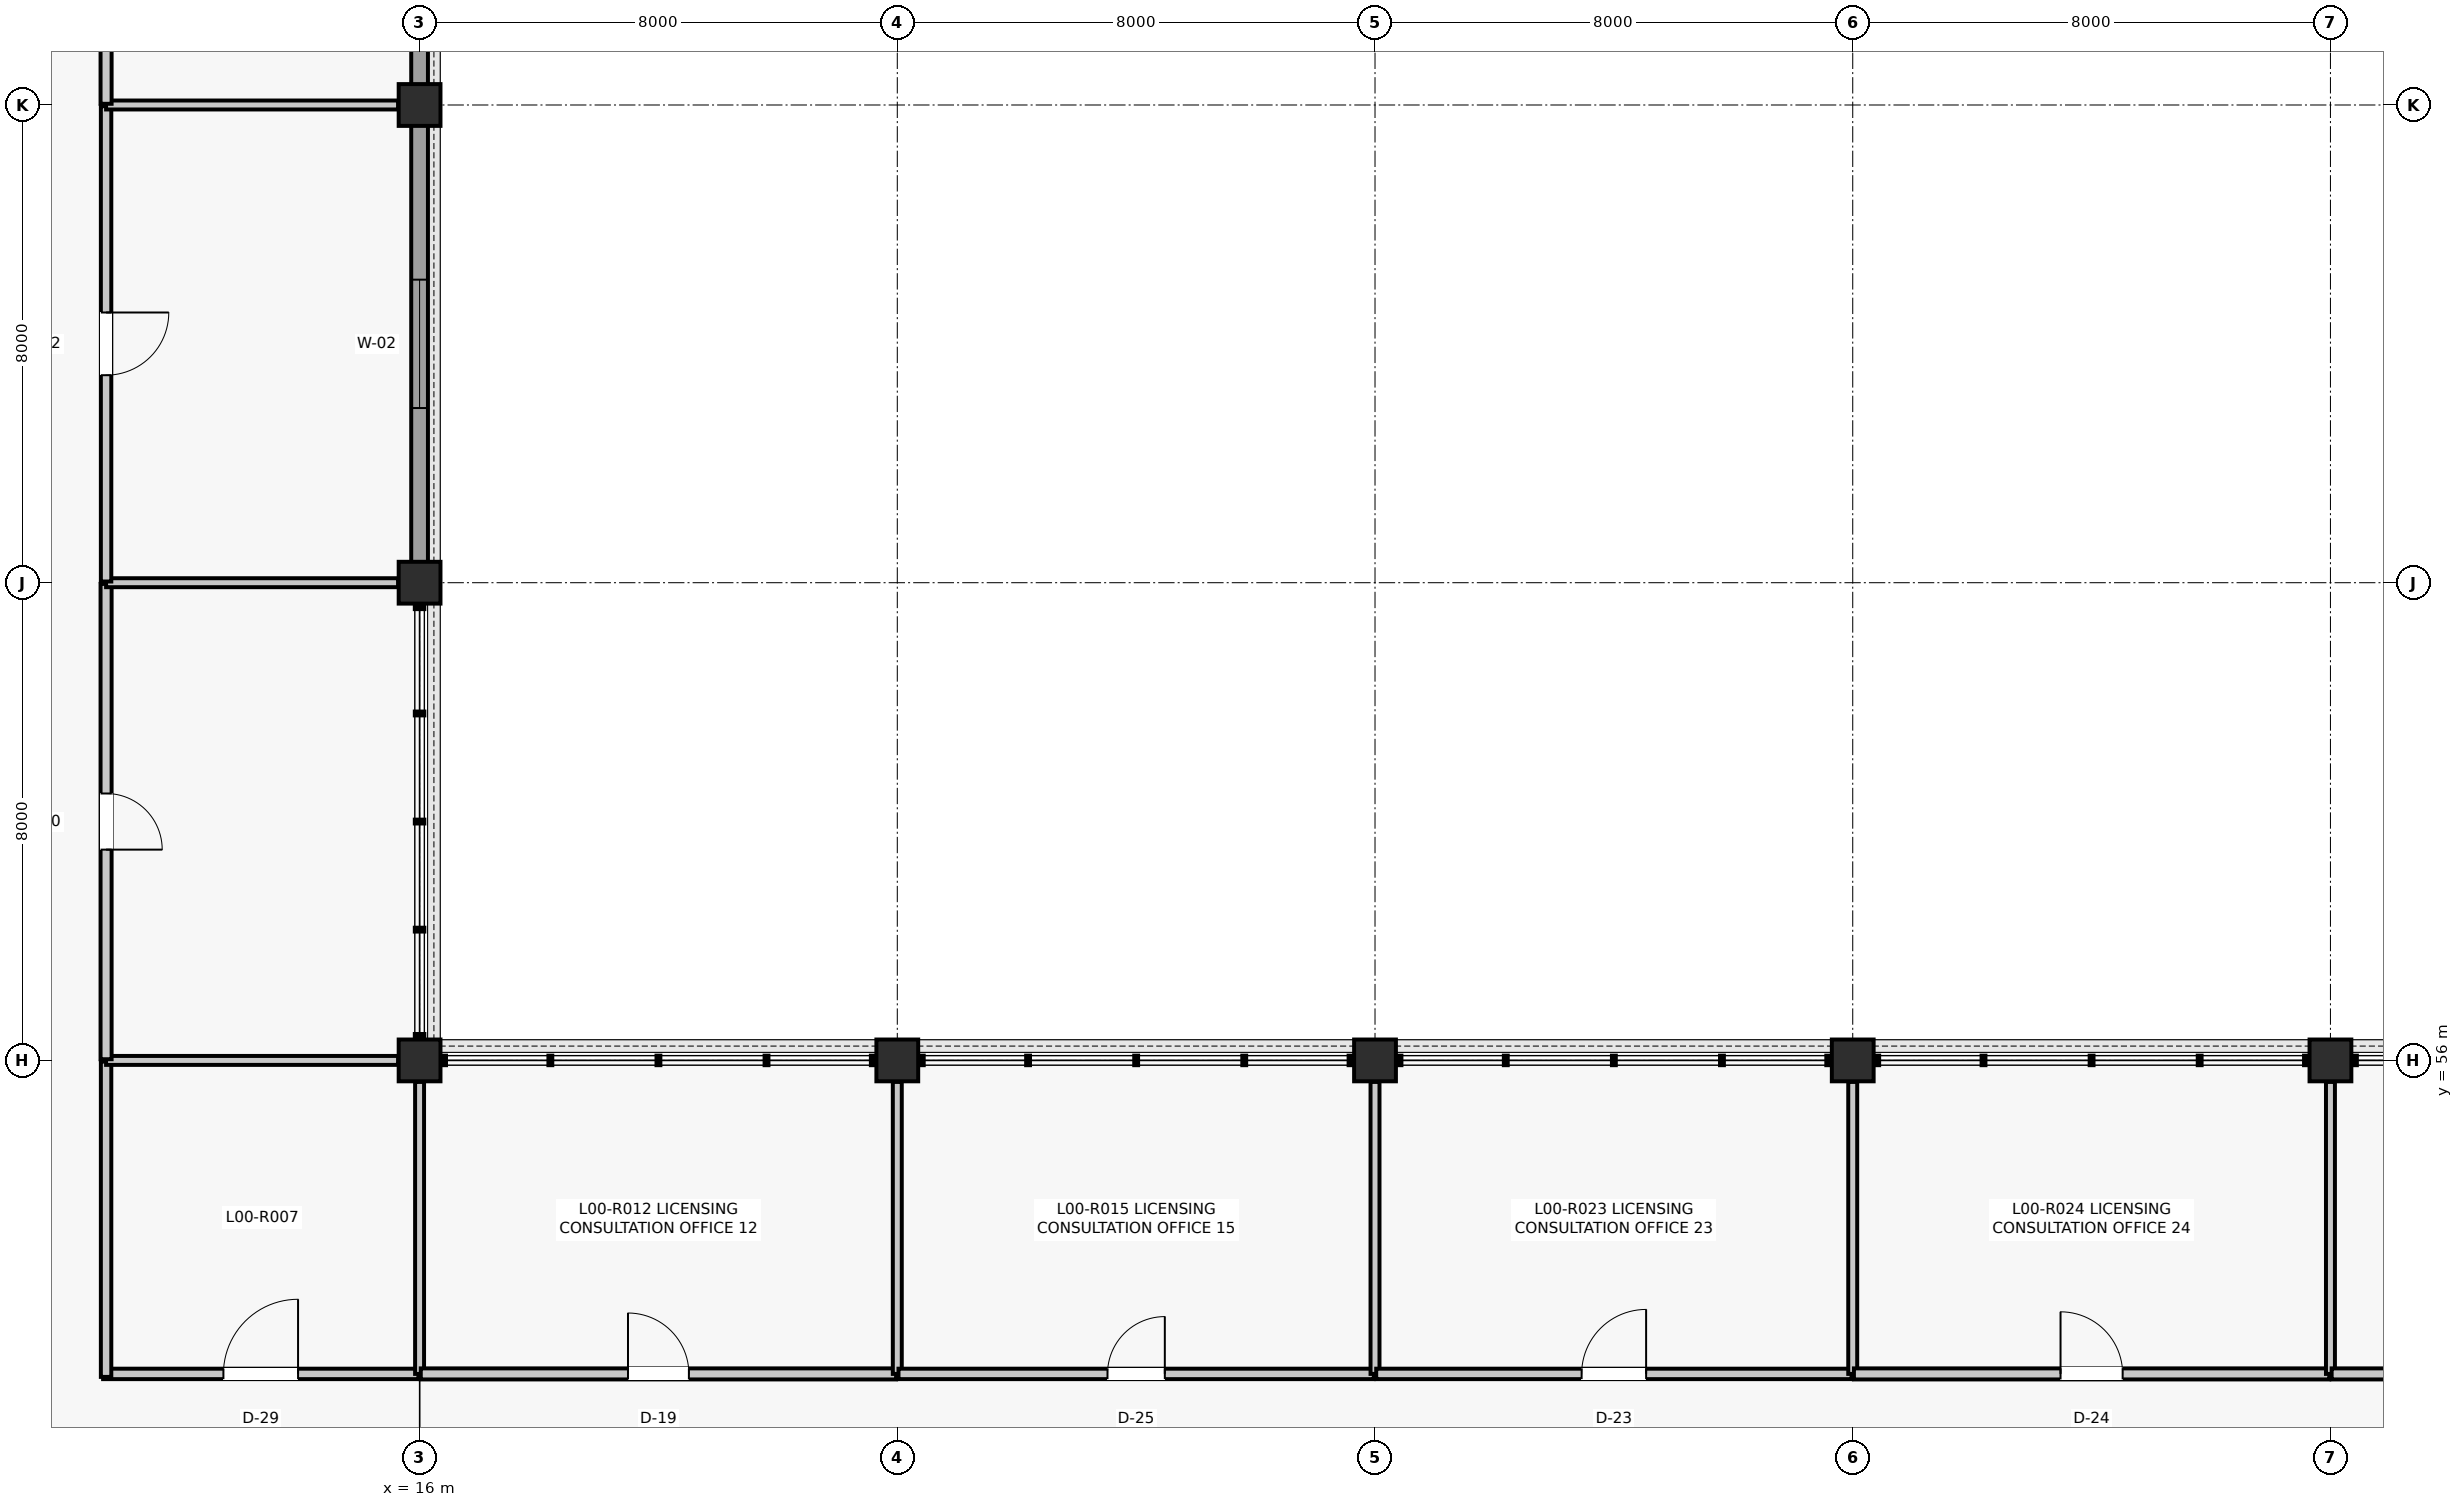
"""IFC4 building model, lengths in metres.
Left out: names, types, materials, properties, quantities, classifications, styles, units other than length and angle.
Written with IfcOpenShell. Run it as: python <this file> out.ifc"""

import sys

from ifc_helpers import new_model, si_unit, direction, frame, frame_2d, origin, origin_2d, place, context, subcontext, project, spatial, rectangle, extrude, element, fill, save


model = new_model("IFC4")
c1 = context("Model", 3, precision=1e-05, world=origin(), true_north=direction((0.0, 1.0)))
c2 = subcontext(c1, "Body", "Model", "MODEL_VIEW")
j1 = project(units=[si_unit("LENGTHUNIT", "METRE"), si_unit("PLANEANGLEUNIT", "RADIAN")], contexts=[c1])
p1 = place(None, origin())
s1 = spatial("IfcSite", under=j1, at=p1, CompositionType="ELEMENT")
p2 = place(p1, origin())
s2 = spatial("IfcBuilding", under=s1, at=p2, CompositionType="ELEMENT")
p3 = place(p2, origin())
s3 = spatial("IfcBuildingStorey", under=s2, at=p3, CompositionType="ELEMENT", Elevation=0.0)
for number, where, z_axis, x_axis in (
    (1, (16.0, 56.0, 0.0), (0.0, 0.0, 1.0), (1.0, 0.0, 0.0)),
    (2, (16.0, 64.0, 0.0), (0.0, 0.0, 1.0), (1.0, 0.0, 0.0)),
    (3, (16.0, 72.0, 0.0), (0.0, 0.0, 1.0), (1.0, 0.0, 0.0)),
    (4, (24.0, 56.0, 0.0), (0.0, 0.0, 1.0), (1.0, 0.0, 0.0)),
    (5, (32.0, 56.0, 0.0), (0.0, 0.0, 1.0), (1.0, 0.0, 0.0)),
    (6, (40.0, 56.0, 0.0), (0.0, 0.0, 1.0), (1.0, 0.0, 0.0)),
    (7, (48.0, 56.0, 0.0), (0.0, 0.0, 1.0), (1.0, 0.0, 0.0)),
):
    element("IfcColumn", number, at=place(p3, frame(where, z_axis=z_axis, x_axis=x_axis)), inside=s3, PredefinedType="COLUMN", context=c2, shape_type="SweptSolid", body=[
        extrude(rectangle(XDim=0.7, YDim=0.7, at=origin_2d()), origin(), (0.0, 0.0, 1.0), 5.28),
    ])
p4 = place(p3, frame((16.0, 64.335, 0.0), z_axis=(0.0, 0.0, 1.0), x_axis=(0.0, 1.0, 0.0)))
e8 = element("IfcWall", 8, at=p4, inside=s3, PredefinedType="SOLIDWALL", context=c2, shape_type="SweptSolid", body=[
    extrude(rectangle(XDim=7.33, YDim=0.28, at=frame_2d((3.665, 0.0))), origin(), (0.0, 0.0, 1.0), 4.619),
])
p5 = place(p4, frame((2.59, 0.0, 0.9)))
e9 = element("IfcOpeningElement", 9, at=p5, cuts=e8, PredefinedType="OPENING", context=c2, shape_type="SweptSolid", body=[
    extrude(rectangle(XDim=2.15, YDim=2.8, at=frame_2d((1.075, 1.4))), frame((0.0, 0.15, 0.0), z_axis=(0.0, -1.0, 0.0), x_axis=(1.0, 0.0, 0.0)), (0.0, 0.0, 1.0), 0.3),
])
p6 = place(p3, frame((16.0, 72.335, 0.0), z_axis=(0.0, 0.0, 1.0), x_axis=(0.0, 1.0, 0.0)))
e10 = element("IfcWall", 10, at=p6, inside=s3, PredefinedType="SOLIDWALL", context=c2, shape_type="SweptSolid", body=[
    extrude(rectangle(XDim=7.33, YDim=0.28, at=frame_2d((3.665, 0.0))), origin(), (0.0, 0.0, 1.0), 4.682),
])
p7 = place(p6, frame((2.74, 0.0, 0.9)))
e11 = element("IfcOpeningElement", 11, at=p7, cuts=e10, PredefinedType="OPENING", context=c2, shape_type="SweptSolid", body=[
    extrude(rectangle(XDim=1.85, YDim=2.65, at=frame_2d((0.925, 1.325))), frame((0.0, 0.15, 0.0), z_axis=(0.0, -1.0, 0.0), x_axis=(1.0, 0.0, 0.0)), (0.0, 0.0, 1.0), 0.3),
])
p8 = place(p3, frame((10.7, 50.75, 0.0), z_axis=(0.0, 0.0, 1.0), x_axis=(1.0, 0.0, 0.0)))
e12 = element("IfcWall", 12, at=p8, inside=s3, PredefinedType="PARTITIONING", context=c2, shape_type="SweptSolid", body=[
    extrude(rectangle(XDim=5.28, YDim=0.175, at=frame_2d((2.64, 0.0))), origin(), (0.0, 0.0, 1.0), 4.403),
])
p9 = place(p8, frame((2.015, 0.0, 0.0)))
e13 = element("IfcOpeningElement", 13, at=p9, cuts=e12, PredefinedType="OPENING", context=c2, shape_type="SweptSolid", body=[
    extrude(rectangle(XDim=1.25, YDim=2.18, at=frame_2d((0.625, 1.09))), frame((0.0, 0.097, 0.0), z_axis=(0.0, -1.0, 0.0), x_axis=(1.0, 0.0, 0.0)), (0.0, 0.0, 1.0), 0.195),
])
p10 = place(p3, frame((10.75, 50.7, 0.0), z_axis=(0.0, 0.0, 1.0), x_axis=(0.0, 1.0, 0.0)))
e14 = element("IfcWall", 14, at=p10, inside=s3, PredefinedType="PARTITIONING", context=c2, shape_type="SweptSolid", body=[
    extrude(rectangle(XDim=5.28, YDim=0.175, at=frame_2d((2.64, 0.0))), origin(), (0.0, 0.0, 1.0), 4.327),
])
p11 = place(p3, frame((10.75, 56.0, 0.0), z_axis=(0.0, 0.0, 1.0), x_axis=(1.0, 0.0, 0.0)))
e15 = element("IfcWall", 15, at=p11, inside=s3, PredefinedType="PARTITIONING", context=c2, shape_type="SweptSolid", body=[
    extrude(rectangle(XDim=4.89, YDim=0.15, at=frame_2d((2.445, 0.0))), origin(), (0.0, 0.0, 1.0), 4.327),
])
p12 = place(p3, frame((16.0, 50.75, 0.0), z_axis=(0.0, 0.0, 1.0), x_axis=(0.0, 1.0, 0.0)))
e16 = element("IfcWall", 16, at=p12, inside=s3, PredefinedType="PARTITIONING", context=c2, shape_type="SweptSolid", body=[
    extrude(rectangle(XDim=4.89, YDim=0.15, at=frame_2d((2.445, 0.0))), origin(), (0.0, 0.0, 1.0), 4.403),
])
p13 = place(p3, frame((10.75, 56.02, 0.0), z_axis=(0.0, 0.0, 1.0), x_axis=(0.0, 1.0, 0.0)))
e17 = element("IfcWall", 17, at=p13, inside=s3, PredefinedType="PARTITIONING", context=c2, shape_type="SweptSolid", body=[
    extrude(rectangle(XDim=7.96, YDim=0.185, at=frame_2d((3.98, 0.0))), origin(), (0.0, 0.0, 1.0), 4.327),
])
p14 = place(p13, frame((3.51, 0.0, 0.0)))
e18 = element("IfcOpeningElement", 18, at=p14, cuts=e17, PredefinedType="OPENING", context=c2, shape_type="SweptSolid", body=[
    extrude(rectangle(XDim=0.94, YDim=2.12, at=frame_2d((0.47, 1.06))), frame((0.0, 0.103, 0.0), z_axis=(0.0, -1.0, 0.0), x_axis=(1.0, 0.0, 0.0)), (0.0, 0.0, 1.0), 0.205),
])
p15 = place(p3, frame((10.75, 64.0, 0.0), z_axis=(0.0, 0.0, 1.0), x_axis=(1.0, 0.0, 0.0)))
e19 = element("IfcWall", 19, at=p15, inside=s3, PredefinedType="PARTITIONING", context=c2, shape_type="SweptSolid", body=[
    extrude(rectangle(XDim=4.89, YDim=0.15, at=frame_2d((2.445, 0.0))), origin(), (0.0, 0.0, 1.0), 4.408),
])
p16 = place(p3, frame((10.75, 64.02, 0.0), z_axis=(0.0, 0.0, 1.0), x_axis=(0.0, 1.0, 0.0)))
e20 = element("IfcWall", 20, at=p16, inside=s3, PredefinedType="PARTITIONING", context=c2, shape_type="SweptSolid", body=[
    extrude(rectangle(XDim=7.96, YDim=0.175, at=frame_2d((3.98, 0.0))), origin(), (0.0, 0.0, 1.0), 4.341),
])
p17 = place(p16, frame((3.455, 0.0, 0.0)))
e21 = element("IfcOpeningElement", 21, at=p17, cuts=e20, PredefinedType="OPENING", context=c2, shape_type="SweptSolid", body=[
    extrude(rectangle(XDim=1.05, YDim=2.15, at=frame_2d((0.525, 1.075))), frame((0.0, 0.097, 0.0), z_axis=(0.0, -1.0, 0.0), x_axis=(1.0, 0.0, 0.0)), (0.0, 0.0, 1.0), 0.195),
])
p18 = place(p3, frame((10.75, 72.0, 0.0), z_axis=(0.0, 0.0, 1.0), x_axis=(1.0, 0.0, 0.0)))
e22 = element("IfcWall", 22, at=p18, inside=s3, PredefinedType="PARTITIONING", context=c2, shape_type="SweptSolid", body=[
    extrude(rectangle(XDim=4.89, YDim=0.15, at=frame_2d((2.445, 0.0))), origin(), (0.0, 0.0, 1.0), 4.341),
])
p19 = place(p3, frame((10.75, 72.02, 0.0), z_axis=(0.0, 0.0, 1.0), x_axis=(0.0, 1.0, 0.0)))
e23 = element("IfcWall", 23, at=p19, inside=s3, PredefinedType="PARTITIONING", context=c2, shape_type="SweptSolid", body=[
    extrude(rectangle(XDim=7.96, YDim=0.185, at=frame_2d((3.98, 0.0))), origin(), (0.0, 0.0, 1.0), 4.341),
])
p20 = place(p19, frame((3.48, 0.0, 0.0)))
e24 = element("IfcOpeningElement", 24, at=p20, cuts=e23, PredefinedType="OPENING", context=c2, shape_type="SweptSolid", body=[
    extrude(rectangle(XDim=1.0, YDim=2.15, at=frame_2d((0.5, 1.075))), frame((0.0, 0.103, 0.0), z_axis=(0.0, -1.0, 0.0), x_axis=(1.0, 0.0, 0.0)), (0.0, 0.0, 1.0), 0.205),
])
p21 = place(p3, frame((16.02, 50.75, 0.0), z_axis=(0.0, 0.0, 1.0), x_axis=(1.0, 0.0, 0.0)))
e25 = element("IfcWall", 25, at=p21, inside=s3, PredefinedType="PARTITIONING", context=c2, shape_type="SweptSolid", body=[
    extrude(rectangle(XDim=7.96, YDim=0.185, at=frame_2d((3.98, 0.0))), origin(), (0.0, 0.0, 1.0), 4.403),
])
p22 = place(p21, frame((3.47, 0.0, 0.0)))
e26 = element("IfcOpeningElement", 26, at=p22, cuts=e25, PredefinedType="OPENING", context=c2, shape_type="SweptSolid", body=[
    extrude(rectangle(XDim=1.02, YDim=2.2, at=frame_2d((0.51, 1.1))), frame((0.0, 0.103, 0.0), z_axis=(0.0, -1.0, 0.0), x_axis=(1.0, 0.0, 0.0)), (0.0, 0.0, 1.0), 0.205),
])
p23 = place(p3, frame((24.0, 50.75, 0.0), z_axis=(0.0, 0.0, 1.0), x_axis=(0.0, 1.0, 0.0)))
e27 = element("IfcWall", 27, at=p23, inside=s3, PredefinedType="PARTITIONING", context=c2, shape_type="SweptSolid", body=[
    extrude(rectangle(XDim=4.89, YDim=0.15, at=frame_2d((2.445, 0.0))), origin(), (0.0, 0.0, 1.0), 4.412),
])
p24 = place(p3, frame((24.02, 50.75, 0.0), z_axis=(0.0, 0.0, 1.0), x_axis=(1.0, 0.0, 0.0)))
e28 = element("IfcWall", 28, at=p24, inside=s3, PredefinedType="PARTITIONING", context=c2, shape_type="SweptSolid", body=[
    extrude(rectangle(XDim=7.96, YDim=0.175, at=frame_2d((3.98, 0.0))), origin(), (0.0, 0.0, 1.0), 4.404),
])
p25 = place(p24, frame((3.5, 0.0, 0.0)))
e29 = element("IfcOpeningElement", 29, at=p25, cuts=e28, PredefinedType="OPENING", context=c2, shape_type="SweptSolid", body=[
    extrude(rectangle(XDim=0.96, YDim=2.14, at=frame_2d((0.48, 1.07))), frame((0.0, 0.097, 0.0), z_axis=(0.0, -1.0, 0.0), x_axis=(1.0, 0.0, 0.0)), (0.0, 0.0, 1.0), 0.195),
])
p26 = place(p3, frame((32.0, 50.75, 0.0), z_axis=(0.0, 0.0, 1.0), x_axis=(0.0, 1.0, 0.0)))
e30 = element("IfcWall", 30, at=p26, inside=s3, PredefinedType="PARTITIONING", context=c2, shape_type="SweptSolid", body=[
    extrude(rectangle(XDim=4.89, YDim=0.15, at=frame_2d((2.445, 0.0))), origin(), (0.0, 0.0, 1.0), 4.404),
])
p27 = place(p3, frame((32.02, 50.75, 0.0), z_axis=(0.0, 0.0, 1.0), x_axis=(1.0, 0.0, 0.0)))
e31 = element("IfcWall", 31, at=p27, inside=s3, PredefinedType="PARTITIONING", context=c2, shape_type="SweptSolid", body=[
    extrude(rectangle(XDim=7.96, YDim=0.175, at=frame_2d((3.98, 0.0))), origin(), (0.0, 0.0, 1.0), 4.404),
])
p28 = place(p27, frame((3.44, 0.0, 0.0)))
e32 = element("IfcOpeningElement", 32, at=p28, cuts=e31, PredefinedType="OPENING", context=c2, shape_type="SweptSolid", body=[
    extrude(rectangle(XDim=1.08, YDim=2.2, at=frame_2d((0.54, 1.1))), frame((0.0, 0.097, 0.0), z_axis=(0.0, -1.0, 0.0), x_axis=(1.0, 0.0, 0.0)), (0.0, 0.0, 1.0), 0.195),
])
p29 = place(p3, frame((40.0, 50.75, 0.0), z_axis=(0.0, 0.0, 1.0), x_axis=(0.0, 1.0, 0.0)))
e33 = element("IfcWall", 33, at=p29, inside=s3, PredefinedType="PARTITIONING", context=c2, shape_type="SweptSolid", body=[
    extrude(rectangle(XDim=4.89, YDim=0.15, at=frame_2d((2.445, 0.0))), origin(), (0.0, 0.0, 1.0), 4.471),
])
p30 = place(p3, frame((40.02, 50.75, 0.0), z_axis=(0.0, 0.0, 1.0), x_axis=(1.0, 0.0, 0.0)))
e34 = element("IfcWall", 34, at=p30, inside=s3, PredefinedType="PARTITIONING", context=c2, shape_type="SweptSolid", body=[
    extrude(rectangle(XDim=7.96, YDim=0.185, at=frame_2d((3.98, 0.0))), origin(), (0.0, 0.0, 1.0), 4.403),
])
p31 = place(p30, frame((3.46, 0.0, 0.0)))
e35 = element("IfcOpeningElement", 35, at=p31, cuts=e34, PredefinedType="OPENING", context=c2, shape_type="SweptSolid", body=[
    extrude(rectangle(XDim=1.04, YDim=2.18, at=frame_2d((0.52, 1.09))), frame((0.0, 0.103, 0.0), z_axis=(0.0, -1.0, 0.0), x_axis=(1.0, 0.0, 0.0)), (0.0, 0.0, 1.0), 0.205),
])
p32 = place(p3, frame((48.0, 50.75, 0.0), z_axis=(0.0, 0.0, 1.0), x_axis=(0.0, 1.0, 0.0)))
e36 = element("IfcWall", 36, at=p32, inside=s3, PredefinedType="PARTITIONING", context=c2, shape_type="SweptSolid", body=[
    extrude(rectangle(XDim=4.89, YDim=0.15, at=frame_2d((2.445, 0.0))), origin(), (0.0, 0.0, 1.0), 4.403),
])
p33 = place(p3, frame((48.02, 50.75, 0.0), z_axis=(0.0, 0.0, 1.0), x_axis=(1.0, 0.0, 0.0)))
e37 = element("IfcWall", 37, at=p33, inside=s3, PredefinedType="PARTITIONING", context=c2, shape_type="SweptSolid", body=[
    extrude(rectangle(XDim=7.96, YDim=0.185, at=frame_2d((3.98, 0.0))), origin(), (0.0, 0.0, 1.0), 4.403),
])
p34 = place(p33, frame((3.42, 0.0, 0.0)))
e38 = element("IfcOpeningElement", 38, at=p34, cuts=e37, PredefinedType="OPENING", context=c2, shape_type="SweptSolid", body=[
    extrude(rectangle(XDim=1.12, YDim=2.22, at=frame_2d((0.56, 1.11))), frame((0.0, 0.103, 0.0), z_axis=(0.0, -1.0, 0.0), x_axis=(1.0, 0.0, 0.0)), (0.0, 0.0, 1.0), 0.205),
])
p35 = place(p5, origin())
e39 = element("IfcWindow", 39, at=p35, inside=s3, PartitioningType="SINGLE_PANEL", PredefinedType="WINDOW", context=c2, shape_type="SweptSolid", body=[
    extrude(rectangle(XDim=2.15, YDim=2.8, at=frame_2d((1.075, 1.4))), frame((0.0, 0.03, 0.0), z_axis=(0.0, -1.0, 0.0), x_axis=(1.0, 0.0, 0.0)), (0.0, 0.0, 1.0), 0.06),
])
fill(e9, e39)
p36 = place(p9, origin())
e40 = element("IfcDoor", 40, at=p36, inside=s3, OperationType="SINGLE_SWING_RIGHT", PredefinedType="DOOR", context=c2, shape_type="SweptSolid", body=[
    extrude(rectangle(XDim=1.25, YDim=2.18, at=frame_2d((0.625, 1.09))), frame((0.0, 0.025, 0.0), z_axis=(0.0, -1.0, 0.0), x_axis=(1.0, 0.0, 0.0)), (0.0, 0.0, 1.0), 0.05),
])
fill(e13, e40)
p37 = place(p14, frame((0.94, 0.0, 0.0), z_axis=(0.0, 0.0, 1.0), x_axis=(-1.0, 0.0, 0.0)))
e41 = element("IfcDoor", 41, at=p37, inside=s3, OperationType="SINGLE_SWING_LEFT", PredefinedType="DOOR", context=c2, shape_type="SweptSolid", body=[
    extrude(rectangle(XDim=0.94, YDim=2.12, at=frame_2d((0.47, 1.06))), frame((0.0, 0.025, 0.0), z_axis=(0.0, -1.0, 0.0), x_axis=(1.0, 0.0, 0.0)), (0.0, 0.0, 1.0), 0.05),
])
fill(e18, e41)
p38 = place(p17, frame((1.05, 0.0, 0.0), z_axis=(0.0, 0.0, 1.0), x_axis=(-1.0, 0.0, 0.0)))
e42 = element("IfcDoor", 42, at=p38, inside=s3, OperationType="SINGLE_SWING_RIGHT", PredefinedType="DOOR", context=c2, shape_type="SweptSolid", body=[
    extrude(rectangle(XDim=1.05, YDim=2.15, at=frame_2d((0.525, 1.075))), frame((0.0, 0.025, 0.0), z_axis=(0.0, -1.0, 0.0), x_axis=(1.0, 0.0, 0.0)), (0.0, 0.0, 1.0), 0.05),
])
fill(e21, e42)
p39 = place(p22, origin())
e43 = element("IfcDoor", 43, at=p39, inside=s3, OperationType="SINGLE_SWING_LEFT", PredefinedType="DOOR", context=c2, shape_type="SweptSolid", body=[
    extrude(rectangle(XDim=1.02, YDim=2.2, at=frame_2d((0.51, 1.1))), frame((0.0, 0.025, 0.0), z_axis=(0.0, -1.0, 0.0), x_axis=(1.0, 0.0, 0.0)), (0.0, 0.0, 1.0), 0.05),
])
fill(e26, e43)
p40 = place(p25, origin())
e44 = element("IfcDoor", 44, at=p40, inside=s3, OperationType="SINGLE_SWING_RIGHT", PredefinedType="DOOR", context=c2, shape_type="SweptSolid", body=[
    extrude(rectangle(XDim=0.96, YDim=2.14, at=frame_2d((0.48, 1.07))), frame((0.0, 0.025, 0.0), z_axis=(0.0, -1.0, 0.0), x_axis=(1.0, 0.0, 0.0)), (0.0, 0.0, 1.0), 0.05),
])
fill(e29, e44)
p41 = place(p28, origin())
e45 = element("IfcDoor", 45, at=p41, inside=s3, OperationType="SINGLE_SWING_RIGHT", PredefinedType="DOOR", context=c2, shape_type="SweptSolid", body=[
    extrude(rectangle(XDim=1.08, YDim=2.2, at=frame_2d((0.54, 1.1))), frame((0.0, 0.025, 0.0), z_axis=(0.0, -1.0, 0.0), x_axis=(1.0, 0.0, 0.0)), (0.0, 0.0, 1.0), 0.05),
])
fill(e32, e45)
p42 = place(p31, origin())
e46 = element("IfcDoor", 46, at=p42, inside=s3, OperationType="SINGLE_SWING_LEFT", PredefinedType="DOOR", context=c2, shape_type="SweptSolid", body=[
    extrude(rectangle(XDim=1.04, YDim=2.18, at=frame_2d((0.52, 1.09))), frame((0.0, 0.025, 0.0), z_axis=(0.0, -1.0, 0.0), x_axis=(1.0, 0.0, 0.0)), (0.0, 0.0, 1.0), 0.05),
])
fill(e35, e46)
save(model, sys.argv[1])
